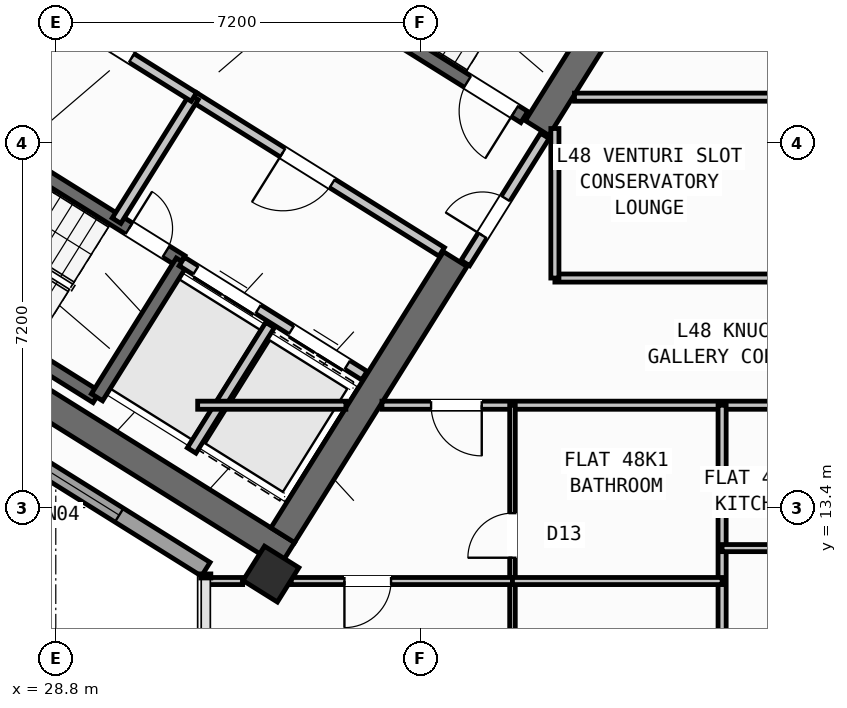
"""IFC4 building model, lengths in metres.
Left out: names, types, materials, properties, quantities, classifications, styles, units other than length and angle.
Written with IfcOpenShell. Run it as: python <this file> out.ifc"""

import sys

from ifc_helpers import new_model, si_unit, direction, frame, frame_2d, origin, origin_2d, place, context, subcontext, project, spatial, rectangle, hollow_rectangle, extrude, source, transform, mapped, element, fill, save


model = new_model("IFC4")
c1 = context("Model", 3, precision=1e-05, world=origin(), true_north=direction((0.0, 1.0)))
c2 = subcontext(c1, "Body", "Model", "MODEL_VIEW")
j1 = project(units=[si_unit("LENGTHUNIT", "METRE"), si_unit("PLANEANGLEUNIT", "RADIAN")], contexts=[c1])
p1 = place(None, origin())
s1 = spatial("IfcSite", under=j1, at=p1, CompositionType="ELEMENT")
p2 = place(p1, origin())
s2 = spatial("IfcBuilding", under=s1, at=p2, CompositionType="ELEMENT")
p3 = place(p2, frame((0.0, 0.0, 191.4)))
s3 = spatial("IfcBuildingStorey", under=s2, at=p3, CompositionType="ELEMENT", Elevation=191.4)
p4 = place(p3, frame((33.366, 12.477, 0.0), z_axis=(0.0, 0.0, 1.0), x_axis=(-0.848047359947, 0.529920442413, 0.0)))
e1 = element("IfcWall", 1, at=p4, inside=s3, PredefinedType="SHEAR", context=c2, shape_type="SweptSolid", body=[
    extrude(rectangle(XDim=13.14, YDim=0.55, at=frame_2d((6.57, 0.0))), origin(), (0.0, 0.0, 1.0), 3.32),
])
p5 = place(p3, frame((40.194, 23.922, 0.0), z_axis=(0.0, 0.0, 1.0), x_axis=(-0.529888438328, -0.848067357541, 0.0)))
e2 = element("IfcWall", 2, at=p5, inside=s3, PredefinedType="SHEAR", context=c2, shape_type="SweptSolid", body=[
    extrude(rectangle(XDim=3.575, YDim=0.55, at=frame_2d((1.788, 0.0))), origin(), (0.0, 0.0, 1.0), 3.32),
])
p6 = place(p3, frame((36.683, 18.304, 0.0), z_axis=(0.0, 0.0, 1.0), x_axis=(-0.529896466841, -0.848062341122, 0.0)))
e3 = element("IfcWall", 3, at=p6, inside=s3, PredefinedType="SHEAR", context=c2, shape_type="SweptSolid", body=[
    extrude(rectangle(XDim=6.425, YDim=0.55, at=frame_2d((3.212, 0.0))), origin(), (0.0, 0.0, 1.0), 3.32),
])
m1 = source(origin(), c2, "Body", "SweptSolid", [
    extrude(hollow_rectangle(XDim=0.8, YDim=0.8, WallThickness=0.032, at=origin_2d()), origin(), (0.0, 0.0, 1.0), 3.6),
])
p7 = place(p3, frame((33.046, 12.087, 0.0), z_axis=(0.0, 0.0, 1.0), x_axis=(-0.848048096156, 0.529919264233, 0.0)))
e4 = element("IfcColumn", 4, at=p7, inside=s3, PredefinedType="COLUMN", context=c2, shape_type="MappedRepresentation", body=[
    mapped(m1, transform((0.0, 0.0, 0.0), scale=1.0)),
])
p8 = place(p3, frame((31.76, 12.183, 0.0), z_axis=(0.0, 0.0, 1.0), x_axis=(-0.848047074256, 0.529920899612, 0.0)))
e5 = element("IfcWall", 5, at=p8, inside=s3, PredefinedType="STANDARD", context=c2, shape_type="SweptSolid", body=[
    extrude(rectangle(XDim=30.652, YDim=0.32, at=frame_2d((15.326, 0.0))), origin(), (0.0, 0.0, 1.0), 3.32),
])
p9 = place(p8, frame((15.166, 0.0, 0.0)))
e6 = element("IfcOpeningElement", 6, at=p9, cuts=e5, PredefinedType="OPENING", context=c2, shape_type="SweptSolid", body=[
    extrude(rectangle(XDim=1.2, YDim=2.15, at=frame_2d((0.6, 1.075))), frame((0.0, 0.17, 0.0), z_axis=(0.0, -1.0, 0.0), x_axis=(1.0, 0.0, 0.0)), (0.0, 0.0, 1.0), 0.34),
])
p10 = place(p8, frame((2.015, 0.0, 0.8)))
e7 = element("IfcOpeningElement", 7, at=p10, cuts=e5, PredefinedType="OPENING", context=c2, shape_type="SweptSolid", body=[
    extrude(rectangle(XDim=2.1, YDim=1.55, at=frame_2d((1.05, 0.775))), frame((0.0, 0.17, 0.0), z_axis=(0.0, -1.0, 0.0), x_axis=(1.0, 0.0, 0.0)), (0.0, 0.0, 1.0), 0.34),
])
p11 = place(p8, frame((7.244, 0.0, 0.8)))
e8 = element("IfcOpeningElement", 8, at=p11, cuts=e5, PredefinedType="OPENING", context=c2, shape_type="SweptSolid", body=[
    extrude(rectangle(XDim=2.1, YDim=1.55, at=frame_2d((1.05, 0.775))), frame((0.0, 0.17, 0.0), z_axis=(0.0, -1.0, 0.0), x_axis=(1.0, 0.0, 0.0)), (0.0, 0.0, 1.0), 0.34),
])
p12 = place(p8, frame((12.623, 0.0, 1.0)))
e9 = element("IfcOpeningElement", 9, at=p12, cuts=e5, PredefinedType="OPENING", context=c2, shape_type="SweptSolid", body=[
    extrude(rectangle(XDim=0.9, YDim=1.25, at=frame_2d((0.45, 0.625))), frame((0.0, 0.17, 0.0), z_axis=(0.0, -1.0, 0.0), x_axis=(1.0, 0.0, 0.0)), (0.0, 0.0, 1.0), 0.34),
])
p13 = place(p8, frame((19.565, 0.0, 0.95)))
e10 = element("IfcOpeningElement", 10, at=p13, cuts=e5, PredefinedType="OPENING", context=c2, shape_type="SweptSolid", body=[
    extrude(rectangle(XDim=1.2, YDim=1.4, at=frame_2d((0.6, 0.7))), frame((0.0, 0.17, 0.0), z_axis=(0.0, -1.0, 0.0), x_axis=(1.0, 0.0, 0.0)), (0.0, 0.0, 1.0), 0.34),
])
p14 = place(p8, frame((25.983, 0.0, 1.0)))
e11 = element("IfcOpeningElement", 11, at=p14, cuts=e5, PredefinedType="OPENING", context=c2, shape_type="SweptSolid", body=[
    extrude(rectangle(XDim=0.9, YDim=1.25, at=frame_2d((0.45, 0.625))), frame((0.0, 0.17, 0.0), z_axis=(0.0, -1.0, 0.0), x_axis=(1.0, 0.0, 0.0)), (0.0, 0.0, 1.0), 0.34),
])
p15 = place(p8, frame((28.433, 0.0, 1.0)))
e12 = element("IfcOpeningElement", 12, at=p15, cuts=e5, PredefinedType="OPENING", context=c2, shape_type="SweptSolid", body=[
    extrude(rectangle(XDim=0.9, YDim=1.25, at=frame_2d((0.45, 0.625))), frame((0.0, 0.17, 0.0), z_axis=(0.0, -1.0, 0.0), x_axis=(1.0, 0.0, 0.0)), (0.0, 0.0, 1.0), 0.34),
])
p16 = place(p3, frame((29.605, 15.581, 0.0), z_axis=(0.0, 0.0, 1.0), x_axis=(-0.848036911448, 0.529937163087, 0.0)))
e13 = element("IfcWall", 13, at=p16, inside=s3, PredefinedType="SHEAR", context=c2, shape_type="SweptSolid", body=[
    extrude(rectangle(XDim=7.46, YDim=0.26, at=frame_2d((3.73, 0.0))), origin(), (0.0, 0.0, 1.0), 3.32),
])
p17 = place(p3, frame((31.28, 18.261, 0.0), z_axis=(0.0, 0.0, 1.0), x_axis=(-0.848051618787, 0.529913626805, 0.0)))
e14 = element("IfcWall", 14, at=p17, inside=s3, PredefinedType="SHEAR", context=c2, shape_type="SweptSolid", body=[
    extrude(rectangle(XDim=7.46, YDim=0.26, at=frame_2d((3.73, 0.0))), origin(), (0.0, 0.0, 1.0), 3.32),
])
p18 = place(p17, frame((0.36, 0.0, 0.0)))
e15 = element("IfcOpeningElement", 15, at=p18, cuts=e14, PredefinedType="OPENING", context=c2, shape_type="SweptSolid", body=[
    extrude(rectangle(XDim=0.86, YDim=2.05, at=frame_2d((0.43, 1.025))), frame((0.0, 0.14, 0.0), z_axis=(0.0, -1.0, 0.0), x_axis=(1.0, 0.0, 0.0)), (0.0, 0.0, 1.0), 0.28),
])
p19 = place(p3, frame((31.288, 18.256, 0.0), z_axis=(0.0, 0.0, 1.0), x_axis=(-0.529943379326, -0.848033026897, 0.0)))
e16 = element("IfcWall", 16, at=p19, inside=s3, PredefinedType="SHEAR", context=c2, shape_type="SweptSolid", body=[
    extrude(rectangle(XDim=3.16, YDim=0.26, at=frame_2d((1.58, 0.0))), origin(), (0.0, 0.0, 1.0), 3.32),
])
p20 = place(p3, frame((38.046, 21.108, 0.0), z_axis=(0.0, 0.0, 1.0), x_axis=(-0.848054434086, 0.529909121291, 0.0)))
e17 = element("IfcWall", 17, at=p20, inside=s3, PredefinedType="SHEAR", context=c2, shape_type="SweptSolid", body=[
    extrude(rectangle(XDim=7.33, YDim=0.26, at=frame_2d((3.665, 0.0))), origin(), (0.0, 0.0, 1.0), 3.32),
])
p21 = place(p20, frame((0.22, 0.0, 0.0)))
e18 = element("IfcOpeningElement", 18, at=p21, cuts=e17, PredefinedType="OPENING", context=c2, shape_type="SweptSolid", body=[
    extrude(rectangle(XDim=1.1, YDim=2.1, at=frame_2d((0.55, 1.05))), frame((0.0, 0.14, 0.0), z_axis=(0.0, -1.0, 0.0), x_axis=(1.0, 0.0, 0.0)), (0.0, 0.0, 1.0), 0.28),
])
p22 = place(p3, frame((34.891, 16.005, 0.0), z_axis=(0.0, 0.0, 1.0), x_axis=(-0.848062873452, 0.529895614884, 0.0)))
e19 = element("IfcWall", 19, at=p22, inside=s3, PredefinedType="STANDARD", context=c2, shape_type="SweptSolid", body=[
    extrude(rectangle(XDim=4.248, YDim=0.2, at=frame_2d((2.124, 0.0))), origin(), (0.0, 0.0, 1.0), 3.31),
])
p23 = place(p22, frame((0.398, 0.0, 0.0)))
e20 = element("IfcOpeningElement", 20, at=p23, cuts=e19, PredefinedType="OPENING", context=c2, shape_type="SweptSolid", body=[
    extrude(rectangle(XDim=1.3, YDim=2.2, at=frame_2d((0.65, 1.1))), frame((0.0, 0.11, 0.0), z_axis=(0.0, -1.0, 0.0), x_axis=(1.0, 0.0, 0.0)), (0.0, 0.0, 1.0), 0.22),
])
p24 = place(p22, frame((2.473, 0.0, 0.0)))
e21 = element("IfcOpeningElement", 21, at=p24, cuts=e19, PredefinedType="OPENING", context=c2, shape_type="SweptSolid", body=[
    extrude(rectangle(XDim=1.45, YDim=2.25, at=frame_2d((0.725, 1.125))), frame((0.0, 0.11, 0.0), z_axis=(0.0, -1.0, 0.0), x_axis=(1.0, 0.0, 0.0)), (0.0, 0.0, 1.0), 0.22),
])
p25 = place(p3, frame((36.417, 18.447, 0.0), z_axis=(0.0, 0.0, 1.0), x_axis=(-0.848064879198, 0.529892404805, 0.0)))
e22 = element("IfcWall", 22, at=p25, inside=s3, PredefinedType="STANDARD", context=c2, shape_type="SweptSolid", body=[
    extrude(rectangle(XDim=5.768, YDim=0.2, at=frame_2d((2.884, 0.0))), origin(), (0.0, 0.0, 1.0), 3.31),
])
p26 = place(p25, frame((2.548, 0.0, 0.0)))
e23 = element("IfcOpeningElement", 23, at=p26, cuts=e22, PredefinedType="OPENING", context=c2, shape_type="SweptSolid", body=[
    extrude(rectangle(XDim=1.15, YDim=2.1, at=frame_2d((0.575, 1.05))), frame((0.0, 0.11, 0.0), z_axis=(0.0, -1.0, 0.0), x_axis=(1.0, 0.0, 0.0)), (0.0, 0.0, 1.0), 0.22),
])
p27 = place(p3, frame((33.029, 17.003, 0.0), z_axis=(0.0, 0.0, 1.0), x_axis=(-0.529916267533, -0.848049968695, 0.0)))
e24 = element("IfcWall", 24, at=p27, inside=s3, PredefinedType="STANDARD", context=c2, shape_type="SweptSolid", body=[
    extrude(rectangle(XDim=2.92, YDim=0.2, at=frame_2d((1.46, 0.0))), origin(), (0.0, 0.0, 1.0), 3.31),
])
for number, where, z_axis, x_axis in (
    (25, (31.525, 21.504, 0.0), (0.0, 0.0, 1.0), (-0.53, -0.848, 0.0)),
    (26, (28.71, 23.263, 0.0), (0.0, 0.0, 1.0), (-0.53, -0.848, 0.0)),
):
    element("IfcWall", number, at=place(p3, frame(where, z_axis=z_axis, x_axis=x_axis)), inside=s3, PredefinedType="STANDARD", context=c2, shape_type="SweptSolid", body=[
        extrude(rectangle(XDim=2.88, YDim=0.2, at=frame_2d((1.44, 0.0))), origin(), (0.0, 0.0, 1.0), 3.31),
    ])
p28 = place(p3, frame((31.525, 21.504, 0.0), z_axis=(0.0, 0.0, 1.0), x_axis=(-0.848040211232, 0.529931882541, 0.0)))
e27 = element("IfcWall", 27, at=p28, inside=s3, PredefinedType="STANDARD", context=c2, shape_type="SweptSolid", body=[
    extrude(rectangle(XDim=6.218, YDim=0.2, at=frame_2d((3.109, 0.0))), origin(), (0.0, 0.0, 1.0), 3.31),
])
p29 = place(p28, frame((4.4, 0.0, 0.0)))
e28 = element("IfcOpeningElement", 28, at=p29, cuts=e27, PredefinedType="OPENING", context=c2, shape_type="SweptSolid", body=[
    extrude(rectangle(XDim=0.86, YDim=2.05, at=frame_2d((0.43, 1.025))), frame((0.0, 0.11, 0.0), z_axis=(0.0, -1.0, 0.0), x_axis=(1.0, 0.0, 0.0)), (0.0, 0.0, 1.0), 0.22),
])
p30 = place(p28, frame((1.45, 0.0, 0.0)))
e29 = element("IfcOpeningElement", 29, at=p30, cuts=e27, PredefinedType="OPENING", context=c2, shape_type="SweptSolid", body=[
    extrude(rectangle(XDim=0.86, YDim=2.05, at=frame_2d((0.43, 1.025))), frame((0.0, 0.11, 0.0), z_axis=(0.0, -1.0, 0.0), x_axis=(1.0, 0.0, 0.0)), (0.0, 0.0, 1.0), 0.22),
])
p31 = place(p3, frame((38.451, 20.737, 0.0), z_axis=(0.0, 0.0, 1.0), x_axis=(-0.529924799939, -0.848044637038, 0.0)))
e30 = element("IfcWall", 30, at=p31, inside=s3, PredefinedType="STANDARD", context=c2, shape_type="SweptSolid", body=[
    extrude(rectangle(XDim=2.96, YDim=0.2, at=frame_2d((1.48, 0.0))), origin(), (0.0, 0.0, 1.0), 3.31),
])
p32 = place(p31, frame((1.46, 0.0, 0.0)))
e31 = element("IfcOpeningElement", 31, at=p32, cuts=e30, PredefinedType="OPENING", context=c2, shape_type="SweptSolid", body=[
    extrude(rectangle(XDim=0.86, YDim=2.05, at=frame_2d((0.43, 1.025))), frame((0.0, 0.11, 0.0), z_axis=(0.0, -1.0, 0.0), x_axis=(1.0, 0.0, 0.0)), (0.0, 0.0, 1.0), 0.22),
])
p33 = place(p3, frame((31.6, 15.42, 0.0), z_axis=(0.0, 0.0, 1.0), x_axis=(1.0, 0.0, 0.0)))
e32 = element("IfcWall", 32, at=p33, inside=s3, PredefinedType="PARTITIONING", context=c2, shape_type="SweptSolid", body=[
    extrude(rectangle(XDim=2.925, YDim=0.16, at=frame_2d((1.462, 0.0))), origin(), (0.0, 0.0, 1.0), 3.31),
])
p34 = place(p3, frame((35.237, 15.42, 0.0), z_axis=(0.0, 0.0, 1.0), x_axis=(1.0, 0.0, 0.0)))
e33 = element("IfcWall", 33, at=p34, inside=s3, PredefinedType="PARTITIONING", context=c2, shape_type="SweptSolid", body=[
    extrude(rectangle(XDim=15.432, YDim=0.16, at=frame_2d((7.716, 0.0))), origin(), (0.0, 0.0, 1.0), 3.31),
])
p35 = place(p34, frame((0.969, 0.0, 0.0)))
e34 = element("IfcOpeningElement", 34, at=p35, cuts=e33, PredefinedType="OPENING", context=c2, shape_type="SweptSolid", body=[
    extrude(rectangle(XDim=1.0, YDim=2.1, at=frame_2d((0.5, 1.05))), frame((0.0, 0.09, 0.0), z_axis=(0.0, -1.0, 0.0), x_axis=(1.0, 0.0, 0.0)), (0.0, 0.0, 1.0), 0.18),
])
p36 = place(p34, frame((8.799, 0.0, 0.0)))
e35 = element("IfcOpeningElement", 35, at=p36, cuts=e33, PredefinedType="OPENING", context=c2, shape_type="SweptSolid", body=[
    extrude(rectangle(XDim=1.0, YDim=2.1, at=frame_2d((0.5, 1.05))), frame((0.0, 0.09, 0.0), z_axis=(0.0, -1.0, 0.0), x_axis=(1.0, 0.0, 0.0)), (0.0, 0.0, 1.0), 0.18),
])
p37 = place(p3, frame((38.65, 17.93, 0.0), z_axis=(0.0, 0.0, 1.0), x_axis=(1.0, 0.0, 0.0)))
e36 = element("IfcWall", 36, at=p37, inside=s3, PredefinedType="PARTITIONING", context=c2, shape_type="SweptSolid", body=[
    extrude(rectangle(XDim=9.95, YDim=0.16, at=frame_2d((4.975, 0.0))), origin(), (0.0, 0.0, 1.0), 3.31),
])
p38 = place(p37, frame((4.475, 0.0, 0.0)))
e37 = element("IfcOpeningElement", 37, at=p38, cuts=e36, PredefinedType="OPENING", context=c2, shape_type="SweptSolid", body=[
    extrude(rectangle(XDim=1.0, YDim=2.1, at=frame_2d((0.5, 1.05))), frame((0.0, 0.09, 0.0), z_axis=(0.0, -1.0, 0.0), x_axis=(1.0, 0.0, 0.0)), (0.0, 0.0, 1.0), 0.18),
])
p39 = place(p3, frame((38.65, 17.93, 0.0), z_axis=(0.0, 0.0, 1.0), x_axis=(0.0, 1.0, 0.0)))
e38 = element("IfcWall", 38, at=p39, inside=s3, PredefinedType="PARTITIONING", context=c2, shape_type="SweptSolid", body=[
    extrude(rectangle(XDim=2.951, YDim=0.16, at=frame_2d((1.476, 0.0))), origin(), (0.0, 0.0, 1.0), 3.31),
])
p40 = place(p3, frame((39.037, 21.5, 0.0), z_axis=(0.0, 0.0, 1.0), x_axis=(1.0, 0.0, 0.0)))
e39 = element("IfcWall", 39, at=p40, inside=s3, PredefinedType="PARTITIONING", context=c2, shape_type="SweptSolid", body=[
    extrude(rectangle(XDim=7.215, YDim=0.16, at=frame_2d((3.607, 0.0))), origin(), (0.0, 0.0, 1.0), 3.31),
])
p41 = place(p3, frame((41.95, 1.96, 0.0), z_axis=(0.0, 0.0, 1.0), x_axis=(0.0, 1.0, 0.0)))
e40 = element("IfcWall", 40, at=p41, inside=s3, PredefinedType="PARTITIONING", context=c2, shape_type="SweptSolid", body=[
    extrude(rectangle(XDim=13.46, YDim=0.16, at=frame_2d((6.73, 0.0))), origin(), (0.0, 0.0, 1.0), 3.31),
])
p42 = place(p3, frame((37.813, 1.96, 0.0), z_axis=(0.0, 0.0, 1.0), x_axis=(0.0, 1.0, 0.0)))
e41 = element("IfcWall", 41, at=p42, inside=s3, PredefinedType="PARTITIONING", context=c2, shape_type="SweptSolid", body=[
    extrude(rectangle(XDim=13.46, YDim=0.11, at=frame_2d((6.73, 0.0))), origin(), (0.0, 0.0, 1.0), 3.31),
])
p43 = place(p42, frame((5.5, 0.0, 0.0)))
e42 = element("IfcOpeningElement", 42, at=p43, cuts=e41, PredefinedType="OPENING", context=c2, shape_type="SweptSolid", body=[
    extrude(rectangle(XDim=0.92, YDim=2.08, at=frame_2d((0.46, 1.04))), frame((0.0, 0.065, 0.0), z_axis=(0.0, -1.0, 0.0), x_axis=(1.0, 0.0, 0.0)), (0.0, 0.0, 1.0), 0.13),
])
p44 = place(p42, frame((10.45, 0.0, 0.0)))
e43 = element("IfcOpeningElement", 43, at=p44, cuts=e41, PredefinedType="OPENING", context=c2, shape_type="SweptSolid", body=[
    extrude(rectangle(XDim=0.88, YDim=2.08, at=frame_2d((0.44, 1.04))), frame((0.0, 0.065, 0.0), z_axis=(0.0, -1.0, 0.0), x_axis=(1.0, 0.0, 0.0)), (0.0, 0.0, 1.0), 0.13),
])
p45 = place(p3, frame((31.74, 11.95, 0.0), z_axis=(0.0, 0.0, 1.0), x_axis=(1.0, 0.0, 0.0)))
e44 = element("IfcWall", 44, at=p45, inside=s3, PredefinedType="PLUMBINGWALL", context=c2, shape_type="SweptSolid", body=[
    extrude(rectangle(XDim=0.748, YDim=0.14, at=frame_2d((0.374, 0.0))), origin(), (0.0, 0.0, 1.0), 3.31),
])
p46 = place(p3, frame((33.447, 11.95, 0.0), z_axis=(0.0, 0.0, 1.0), x_axis=(1.0, 0.0, 0.0)))
e45 = element("IfcWall", 45, at=p46, inside=s3, PredefinedType="PLUMBINGWALL", context=c2, shape_type="SweptSolid", body=[
    extrude(rectangle(XDim=4.366, YDim=0.14, at=frame_2d((2.183, 0.0))), origin(), (0.0, 0.0, 1.0), 2.495),
])
p47 = place(p46, frame((1.05, 0.0, 0.0)))
e46 = element("IfcOpeningElement", 46, at=p47, cuts=e45, PredefinedType="OPENING", context=c2, shape_type="SweptSolid", body=[
    extrude(rectangle(XDim=0.92, YDim=2.08, at=frame_2d((0.46, 1.04))), frame((0.0, 0.08, 0.0), z_axis=(0.0, -1.0, 0.0), x_axis=(1.0, 0.0, 0.0)), (0.0, 0.0, 1.0), 0.16),
])
p48 = place(p3, frame((37.813, 11.95, 0.0), z_axis=(0.0, 0.0, 1.0), x_axis=(1.0, 0.0, 0.0)))
e47 = element("IfcWall", 47, at=p48, inside=s3, PredefinedType="PLUMBINGWALL", context=c2, shape_type="SweptSolid", body=[
    extrude(rectangle(XDim=4.137, YDim=0.14, at=frame_2d((2.068, 0.0))), origin(), (0.0, 0.0, 1.0), 2.495),
])
p49 = place(p3, frame((41.95, 12.6, 0.0), z_axis=(0.0, 0.0, 1.0), x_axis=(1.0, 0.0, 0.0)))
e48 = element("IfcWall", 48, at=p49, inside=s3, PredefinedType="PLUMBINGWALL", context=c2, shape_type="SweptSolid", body=[
    extrude(rectangle(XDim=5.122, YDim=0.14, at=frame_2d((2.561, 0.0))), origin(), (0.0, 0.0, 1.0), 2.495),
])
p50 = place(p49, frame((2.101, 0.0, 0.0)))
e49 = element("IfcOpeningElement", 49, at=p50, cuts=e48, PredefinedType="OPENING", context=c2, shape_type="SweptSolid", body=[
    extrude(rectangle(XDim=0.92, YDim=2.08, at=frame_2d((0.46, 1.04))), frame((0.0, 0.08, 0.0), z_axis=(0.0, -1.0, 0.0), x_axis=(1.0, 0.0, 0.0)), (0.0, 0.0, 1.0), 0.16),
])
m2 = source(origin(), c2, "Body", "SweptSolid", [
    extrude(rectangle(XDim=2.1, YDim=1.55, at=frame_2d((1.05, 0.775))), frame((0.0, 0.03, 0.0), z_axis=(0.0, -1.0, 0.0), x_axis=(1.0, 0.0, 0.0)), (0.0, 0.0, 1.0), 0.06),
])
p51 = place(p10, origin())
e50 = element("IfcWindow", 50, at=p51, inside=s3, PartitioningType="SINGLE_PANEL", PredefinedType="WINDOW", context=c2, shape_type="MappedRepresentation", body=[
    mapped(m2, transform((0.0, 0.0, 0.0), scale=1.0)),
])
fill(e7, e50)
m3 = source(origin(), c2, "Body", "SweptSolid", [
    extrude(rectangle(XDim=0.86, YDim=2.05, at=frame_2d((0.43, 1.025))), frame((0.0, 0.025, 0.0), z_axis=(0.0, -1.0, 0.0), x_axis=(1.0, 0.0, 0.0)), (0.0, 0.0, 1.0), 0.05),
])
p52 = place(p18, frame((0.86, 0.0, 0.0), z_axis=(0.0, 0.0, 1.0), x_axis=(-1.0, 0.0, 0.0)))
e51 = element("IfcDoor", 51, at=p52, inside=s3, OperationType="SINGLE_SWING_LEFT", PredefinedType="DOOR", context=c2, shape_type="MappedRepresentation", body=[
    mapped(m3, transform((0.0, 0.0, 0.0), scale=1.0)),
])
fill(e15, e51)
m4 = source(origin(), c2, "Body", "SweptSolid", [
    extrude(rectangle(XDim=1.1, YDim=2.1, at=frame_2d((0.55, 1.05))), frame((0.0, 0.025, 0.0), z_axis=(0.0, -1.0, 0.0), x_axis=(1.0, 0.0, 0.0)), (0.0, 0.0, 1.0), 0.05),
])
p53 = place(p21, origin())
e52 = element("IfcDoor", 52, at=p53, inside=s3, OperationType="SINGLE_SWING_LEFT", PredefinedType="DOOR", context=c2, shape_type="MappedRepresentation", body=[
    mapped(m4, transform((0.0, 0.0, 0.0), scale=1.0)),
])
fill(e18, e52)
m5 = source(origin(), c2, "Body", "SweptSolid", [
    extrude(rectangle(XDim=1.15, YDim=2.1, at=frame_2d((0.575, 1.05))), frame((0.0, 0.025, 0.0), z_axis=(0.0, -1.0, 0.0), x_axis=(1.0, 0.0, 0.0)), (0.0, 0.0, 1.0), 0.05),
])
p54 = place(p26, origin())
e53 = element("IfcDoor", 53, at=p54, inside=s3, OperationType="SINGLE_SWING_RIGHT", PredefinedType="DOOR", context=c2, shape_type="MappedRepresentation", body=[
    mapped(m5, transform((0.0, 0.0, 0.0), scale=1.0)),
])
fill(e23, e53)
m6 = source(origin(), c2, "Body", "SweptSolid", [
    extrude(rectangle(XDim=1.3, YDim=2.2, at=frame_2d((0.65, 1.1))), frame((0.0, 0.025, 0.0), z_axis=(0.0, -1.0, 0.0), x_axis=(1.0, 0.0, 0.0)), (0.0, 0.0, 1.0), 0.05),
])
p55 = place(p23, origin())
e54 = element("IfcDoor", 54, at=p55, inside=s3, OperationType="DOUBLE_DOOR_SLIDING", PredefinedType="DOOR", context=c2, shape_type="MappedRepresentation", body=[
    mapped(m6, transform((0.0, 0.0, 0.0), scale=1.0)),
])
fill(e20, e54)
m7 = source(origin(), c2, "Body", "SweptSolid", [
    extrude(rectangle(XDim=1.45, YDim=2.25, at=frame_2d((0.725, 1.125))), frame((0.0, 0.025, 0.0), z_axis=(0.0, -1.0, 0.0), x_axis=(1.0, 0.0, 0.0)), (0.0, 0.0, 1.0), 0.05),
])
p56 = place(p24, origin())
e55 = element("IfcDoor", 55, at=p56, inside=s3, OperationType="DOUBLE_DOOR_SLIDING", PredefinedType="DOOR", context=c2, shape_type="MappedRepresentation", body=[
    mapped(m7, transform((0.0, 0.0, 0.0), scale=1.0)),
])
fill(e21, e55)
p57 = place(p30, frame((0.86, 0.0, 0.0), z_axis=(0.0, 0.0, 1.0), x_axis=(-1.0, 0.0, 0.0)))
e56 = element("IfcDoor", 56, at=p57, inside=s3, OperationType="SINGLE_SWING_RIGHT", PredefinedType="DOOR", context=c2, shape_type="MappedRepresentation", body=[
    mapped(m3, transform((0.0, 0.0, 0.0), scale=1.0)),
])
fill(e29, e56)
p58 = place(p32, frame((0.86, 0.0, 0.0), z_axis=(0.0, 0.0, 1.0), x_axis=(-1.0, 0.0, 0.0)))
e57 = element("IfcDoor", 57, at=p58, inside=s3, OperationType="SINGLE_SWING_LEFT", PredefinedType="DOOR", context=c2, shape_type="MappedRepresentation", body=[
    mapped(m3, transform((0.0, 0.0, 0.0), scale=1.0)),
])
fill(e31, e57)
m8 = source(origin(), c2, "Body", "SweptSolid", [
    extrude(rectangle(XDim=1.0, YDim=2.1, at=frame_2d((0.5, 1.05))), frame((0.0, 0.025, 0.0), z_axis=(0.0, -1.0, 0.0), x_axis=(1.0, 0.0, 0.0)), (0.0, 0.0, 1.0), 0.05),
])
p59 = place(p35, frame((1.0, 0.0, 0.0), z_axis=(0.0, 0.0, 1.0), x_axis=(-1.0, 0.0, 0.0)))
e58 = element("IfcDoor", 58, at=p59, inside=s3, OperationType="SINGLE_SWING_LEFT", PredefinedType="DOOR", context=c2, shape_type="MappedRepresentation", body=[
    mapped(m8, transform((0.0, 0.0, 0.0), scale=1.0)),
])
fill(e34, e58)
m9 = source(origin(), c2, "Body", "SweptSolid", [
    extrude(rectangle(XDim=0.92, YDim=2.08, at=frame_2d((0.46, 1.04))), frame((0.0, 0.025, 0.0), z_axis=(0.0, -1.0, 0.0), x_axis=(1.0, 0.0, 0.0)), (0.0, 0.0, 1.0), 0.05),
])
p60 = place(p47, frame((0.92, 0.0, 0.0), z_axis=(0.0, 0.0, 1.0), x_axis=(-1.0, 0.0, 0.0)))
e59 = element("IfcDoor", 59, at=p60, inside=s3, OperationType="SINGLE_SWING_RIGHT", PredefinedType="DOOR", context=c2, shape_type="MappedRepresentation", body=[
    mapped(m9, transform((0.0, 0.0, 0.0), scale=1.0)),
])
fill(e46, e59)
m10 = source(origin(), c2, "Body", "SweptSolid", [
    extrude(rectangle(XDim=0.88, YDim=2.08, at=frame_2d((0.44, 1.04))), frame((0.0, 0.025, 0.0), z_axis=(0.0, -1.0, 0.0), x_axis=(1.0, 0.0, 0.0)), (0.0, 0.0, 1.0), 0.05),
])
p61 = place(p44, origin())
e60 = element("IfcDoor", 60, at=p61, inside=s3, OperationType="SINGLE_SWING_LEFT", PredefinedType="DOOR", context=c2, shape_type="MappedRepresentation", body=[
    mapped(m10, transform((0.0, 0.0, 0.0), scale=1.0)),
])
fill(e43, e60)
save(model, sys.argv[1])
